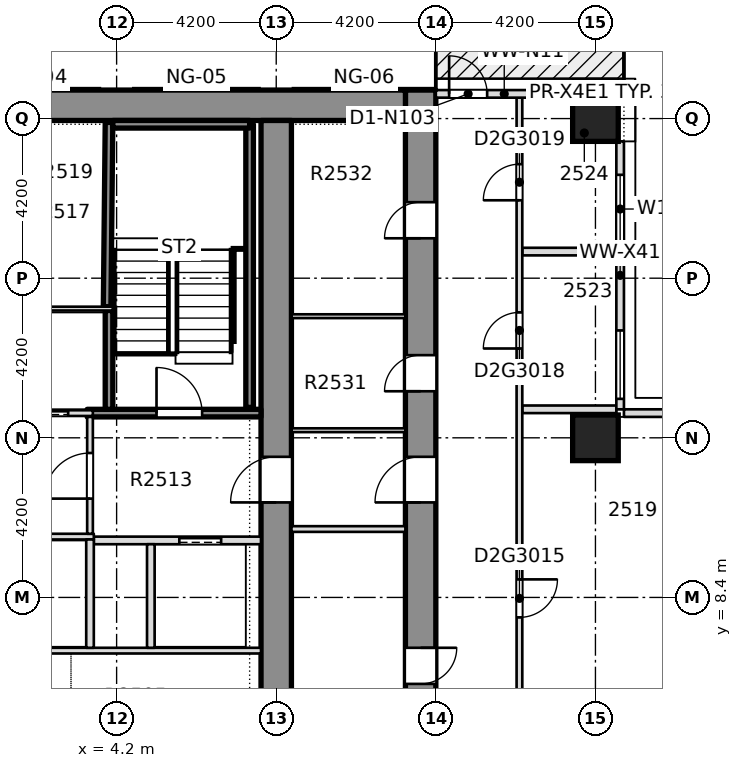
"""IFC4 building model, lengths in metres.
Left out: names, types, materials, properties, quantities, classifications, styles, units other than length and angle.
Written with IfcOpenShell. Run it as: python <this file> out.ifc"""

import sys

from ifc_helpers import new_model, si_unit, direction, frame, frame_2d, origin, origin_2d, place, context, subcontext, project, spatial, rectangle, extrude, element, fill, save


model = new_model("IFC4")
c1 = context("Model", 3, precision=1e-05, world=origin(), true_north=direction((0.0, 1.0)))
c2 = subcontext(c1, "Body", "Model", "MODEL_VIEW")
j1 = project(units=[si_unit("LENGTHUNIT", "METRE"), si_unit("PLANEANGLEUNIT", "RADIAN")], contexts=[c1])
p1 = place(None, origin())
s1 = spatial("IfcSite", under=j1, at=p1, CompositionType="ELEMENT")
p2 = place(p1, origin())
s2 = spatial("IfcBuilding", under=s1, at=p2, CompositionType="ELEMENT")
p3 = place(p2, frame((0.0, 0.0, 101.1)))
s3 = spatial("IfcBuildingStorey", under=s2, at=p3, CompositionType="ELEMENT", Elevation=101.1)
p4 = place(p3, frame((12.2, -8.4, -0.32), z_axis=(0.0, 0.0, 1.0), x_axis=(0.0, 1.0, 0.0)))
e1 = element("IfcWall", 1, at=p4, inside=s3, PredefinedType="SHEAR", context=c2, shape_type="SweptSolid", body=[
    extrude(rectangle(XDim=30.15, YDim=0.8, at=frame_2d((15.075, 0.0))), origin(), (0.0, 0.0, 1.0), 3.45),
])
p5 = place(p4, frame((3.925, 0.0, 0.32)))
e2 = element("IfcOpeningElement", 2, at=p5, cuts=e1, PredefinedType="OPENING", context=c2, shape_type="SweptSolid", body=[
    extrude(rectangle(XDim=0.95, YDim=2.1, at=frame_2d((0.475, 1.05))), frame((0.0, 0.41, 0.0), z_axis=(0.0, -1.0, 0.0), x_axis=(1.0, 0.0, 0.0)), (0.0, 0.0, 1.0), 0.82),
])
p6 = place(p4, frame((9.175, 0.0, 0.32)))
e3 = element("IfcOpeningElement", 3, at=p6, cuts=e1, PredefinedType="OPENING", context=c2, shape_type="SweptSolid", body=[
    extrude(rectangle(XDim=0.95, YDim=2.1, at=frame_2d((0.475, 1.05))), frame((0.0, 0.41, 0.0), z_axis=(0.0, -1.0, 0.0), x_axis=(1.0, 0.0, 0.0)), (0.0, 0.0, 1.0), 0.82),
])
p7 = place(p4, frame((14.525, 0.0, 0.32)))
e4 = element("IfcOpeningElement", 4, at=p7, cuts=e1, PredefinedType="OPENING", context=c2, shape_type="SweptSolid", body=[
    extrude(rectangle(XDim=0.95, YDim=2.1, at=frame_2d((0.475, 1.05))), frame((0.0, 0.41, 0.0), z_axis=(0.0, -1.0, 0.0), x_axis=(1.0, 0.0, 0.0)), (0.0, 0.0, 1.0), 0.82),
])
p8 = place(p4, frame((22.225, 0.0, 0.32)))
e5 = element("IfcOpeningElement", 5, at=p8, cuts=e1, PredefinedType="OPENING", context=c2, shape_type="SweptSolid", body=[
    extrude(rectangle(XDim=0.95, YDim=2.1, at=frame_2d((0.475, 1.05))), frame((0.0, 0.41, 0.0), z_axis=(0.0, -1.0, 0.0), x_axis=(1.0, 0.0, 0.0)), (0.0, 0.0, 1.0), 0.82),
])
p9 = place(p4, frame((26.25, 0.0, 0.32)))
e6 = element("IfcOpeningElement", 6, at=p9, cuts=e1, PredefinedType="OPENING", context=c2, shape_type="SweptSolid", body=[
    extrude(rectangle(XDim=0.95, YDim=2.1, at=frame_2d((0.475, 1.05))), frame((0.0, 0.41, 0.0), z_axis=(0.0, -1.0, 0.0), x_axis=(1.0, 0.0, 0.0)), (0.0, 0.0, 1.0), 0.82),
])
p10 = place(p4, frame((19.3, 0.0, 0.32)))
e7 = element("IfcOpeningElement", 7, at=p10, cuts=e1, PredefinedType="OPENING", context=c2, shape_type="SweptSolid", body=[
    extrude(rectangle(XDim=1.2, YDim=2.1, at=frame_2d((0.6, 1.05))), frame((0.0, 0.41, 0.0), z_axis=(0.0, -1.0, 0.0), x_axis=(1.0, 0.0, 0.0)), (0.0, 0.0, 1.0), 0.82),
])
p11 = place(p3, frame((-11.8, 21.35, -0.32), z_axis=(0.0, 0.0, 1.0), x_axis=(1.0, 0.0, 0.0)))
e8 = element("IfcWall", 8, at=p11, inside=s3, PredefinedType="SHEAR", context=c2, shape_type="SweptSolid", body=[
    extrude(rectangle(XDim=23.6, YDim=0.8, at=frame_2d((11.8, 0.0))), origin(), (0.0, 0.0, 1.0), 3.45),
])
p12 = place(p3, frame((8.4, -7.6, -0.32), z_axis=(0.0, 0.0, 1.0), x_axis=(0.0, 1.0, 0.0)))
e9 = element("IfcWall", 9, at=p12, inside=s3, PredefinedType="SHEAR", context=c2, shape_type="SweptSolid", body=[
    extrude(rectangle(XDim=28.55, YDim=0.8, at=frame_2d((14.275, 0.0))), origin(), (0.0, 0.0, 1.0), 3.45),
])
p13 = place(p12, frame((18.5, 0.0, 0.32)))
e10 = element("IfcOpeningElement", 10, at=p13, cuts=e9, PredefinedType="OPENING", context=c2, shape_type="SweptSolid", body=[
    extrude(rectangle(XDim=1.2, YDim=2.1, at=frame_2d((0.6, 1.05))), frame((0.0, 0.41, 0.0), z_axis=(0.0, -1.0, 0.0), x_axis=(1.0, 0.0, 0.0)), (0.0, 0.0, 1.0), 0.82),
])
for number, where, z_axis, x_axis in (
    (11, (16.8, 12.6, -0.32), (0.0, 0.0, 1.0), (1.0, 0.0, 0.0)),
    (12, (16.8, 21.0, -0.32), (0.0, 0.0, 1.0), (1.0, 0.0, 0.0)),
):
    element("IfcColumn", number, at=place(p3, frame(where, z_axis=z_axis, x_axis=x_axis)), inside=s3, PredefinedType="COLUMN", context=c2, shape_type="SweptSolid", body=[
        extrude(rectangle(XDim=1.2, YDim=1.2, at=origin_2d()), origin(), (0.0, 0.0, 1.0), 3.45),
    ])
for number, where, z_axis, x_axis in (
    (13, (14.875, 13.35, 0.0), (0.0, 0.0, 1.0), (1.0, 0.0, 0.0)),
    (14, (14.875, 17.5, 0.0), (0.0, 0.0, 1.0), (1.0, 0.0, 0.0)),
):
    element("IfcWall", number, at=place(p3, frame(where, z_axis=z_axis, x_axis=x_axis)), inside=s3, PredefinedType="PARTITIONING", context=c2, shape_type="SweptSolid", body=[
        extrude(rectangle(XDim=2.475, YDim=0.2, at=frame_2d((1.238, 0.0))), origin(), (0.0, 0.0, 1.0), 3.13),
    ])
p14 = place(p3, frame((14.8, -10.6, 0.0), z_axis=(0.0, 0.0, 1.0), x_axis=(0.0, 1.0, 0.0)))
e15 = element("IfcWall", 15, at=p14, inside=s3, PredefinedType="PARTITIONING", context=c2, shape_type="SweptSolid", body=[
    extrude(rectangle(XDim=32.15, YDim=0.15, at=frame_2d((16.075, 0.0))), origin(), (0.0, 0.0, 1.0), 3.13),
])
p15 = place(p14, frame((1.05, 0.0, 0.0)))
e16 = element("IfcOpeningElement", 16, at=p15, cuts=e15, PredefinedType="OPENING", context=c2, shape_type="SweptSolid", body=[
    extrude(rectangle(XDim=0.95, YDim=2.1, at=frame_2d((0.475, 1.05))), frame((0.0, 0.085, 0.0), z_axis=(0.0, -1.0, 0.0), x_axis=(1.0, 0.0, 0.0)), (0.0, 0.0, 1.0), 0.17),
])
p16 = place(p14, frame((18.475, 0.0, 0.0)))
e17 = element("IfcOpeningElement", 17, at=p16, cuts=e15, PredefinedType="OPENING", context=c2, shape_type="SweptSolid", body=[
    extrude(rectangle(XDim=1.0, YDim=2.1, at=frame_2d((0.5, 1.05))), frame((0.0, 0.085, 0.0), z_axis=(0.0, -1.0, 0.0), x_axis=(1.0, 0.0, 0.0)), (0.0, 0.0, 1.0), 0.17),
])
p17 = place(p14, frame((25.55, 0.0, 0.0)))
e18 = element("IfcOpeningElement", 18, at=p17, cuts=e15, PredefinedType="OPENING", context=c2, shape_type="SweptSolid", body=[
    extrude(rectangle(XDim=0.95, YDim=2.1, at=frame_2d((0.475, 1.05))), frame((0.0, 0.085, 0.0), z_axis=(0.0, -1.0, 0.0), x_axis=(1.0, 0.0, 0.0)), (0.0, 0.0, 1.0), 0.17),
])
p18 = place(p14, frame((29.45, 0.0, 0.0)))
e19 = element("IfcOpeningElement", 19, at=p18, cuts=e15, PredefinedType="OPENING", context=c2, shape_type="SweptSolid", body=[
    extrude(rectangle(XDim=0.95, YDim=2.1, at=frame_2d((0.475, 1.05))), frame((0.0, 0.085, 0.0), z_axis=(0.0, -1.0, 0.0), x_axis=(1.0, 0.0, 0.0)), (0.0, 0.0, 1.0), 0.17),
])
p19 = place(p14, frame((10.05, 0.0, 0.0)))
e20 = element("IfcOpeningElement", 20, at=p19, cuts=e15, PredefinedType="OPENING", context=c2, shape_type="SweptSolid", body=[
    extrude(rectangle(XDim=1.1, YDim=2.1, at=frame_2d((0.55, 1.05))), frame((0.0, 0.085, 0.0), z_axis=(0.0, -1.0, 0.0), x_axis=(1.0, 0.0, 0.0)), (0.0, 0.0, 1.0), 0.17),
])
p20 = place(p14, frame((4.85, 0.0, 0.0)))
e21 = element("IfcOpeningElement", 21, at=p20, cuts=e15, PredefinedType="OPENING", context=c2, shape_type="SweptSolid", body=[
    extrude(rectangle(XDim=1.0, YDim=2.1, at=frame_2d((0.5, 1.05))), frame((0.0, 0.085, 0.0), z_axis=(0.0, -1.0, 0.0), x_axis=(1.0, 0.0, 0.0)), (0.0, 0.0, 1.0), 0.17),
])
p21 = place(p3, frame((24.6, 13.25, 0.0), z_axis=(0.0, 0.0, 1.0), x_axis=(-1.0, 0.0, 0.0)))
e22 = element("IfcWall", 22, at=p21, inside=s3, PredefinedType="STANDARD", context=c2, shape_type="SweptSolid", body=[
    extrude(rectangle(XDim=7.05, YDim=0.2, at=frame_2d((3.525, 0.0))), origin(), (0.0, 0.0, 1.0), 3.13),
])
p22 = place(p3, frame((17.45, 13.35, 0.0), z_axis=(0.0, 0.0, 1.0), x_axis=(0.0, 1.0, 0.0)))
e23 = element("IfcWall", 23, at=p22, inside=s3, PredefinedType="STANDARD", context=c2, shape_type="SweptSolid", body=[
    extrude(rectangle(XDim=7.05, YDim=0.2, at=frame_2d((3.525, 0.0))), origin(), (0.0, 0.0, 1.0), 3.13),
])
p23 = place(p22, frame((0.275, 0.0, 0.2)))
e24 = element("IfcOpeningElement", 24, at=p23, cuts=e23, PredefinedType="OPENING", context=c2, shape_type="SweptSolid", body=[
    extrude(rectangle(XDim=1.8, YDim=2.65, at=frame_2d((0.9, 1.325))), frame((0.0, 0.11, 0.0), z_axis=(0.0, -1.0, 0.0), x_axis=(1.0, 0.0, 0.0)), (0.0, 0.0, 1.0), 0.22),
])
p24 = place(p22, frame((4.37, 0.0, 0.2)))
e25 = element("IfcOpeningElement", 25, at=p24, cuts=e23, PredefinedType="OPENING", context=c2, shape_type="SweptSolid", body=[
    extrude(rectangle(XDim=1.8, YDim=2.65, at=frame_2d((0.9, 1.325))), frame((0.0, 0.11, 0.0), z_axis=(0.0, -1.0, 0.0), x_axis=(1.0, 0.0, 0.0)), (0.0, 0.0, 1.0), 0.22),
])
p25 = place(p3, frame((16.2, 21.65, 0.0), z_axis=(0.0, 0.0, 1.0), x_axis=(-1.0, 0.0, 0.0)))
e26 = element("IfcWall", 26, at=p25, inside=s3, PredefinedType="STANDARD", context=c2, shape_type="SweptSolid", body=[
    extrude(rectangle(XDim=3.6, YDim=0.2, at=frame_2d((1.8, 0.0))), origin(), (0.0, 0.0, 1.0), 3.13),
])
p26 = place(p25, frame((2.25, 0.0, 0.0)))
e27 = element("IfcOpeningElement", 27, at=p26, cuts=e26, PredefinedType="OPENING", context=c2, shape_type="SweptSolid", body=[
    extrude(rectangle(XDim=1.0, YDim=2.4, at=frame_2d((0.5, 1.2))), frame((0.0, 0.11, 0.0), z_axis=(0.0, -1.0, 0.0), x_axis=(1.0, 0.0, 0.0)), (0.0, 0.0, 1.0), 0.22),
])
p27 = place(p3, frame((-7.999, 7.0, 0.0), z_axis=(0.0, 0.0, 1.0), x_axis=(1.0, 0.0, 0.0)))
e28 = element("IfcWall", 28, at=p27, inside=s3, PredefinedType="PARTITIONING", context=c2, shape_type="SweptSolid", body=[
    extrude(rectangle(XDim=15.998, YDim=0.15, at=frame_2d((7.999, 0.0))), origin(), (0.0, 0.0, 1.0), 3.13),
])
p28 = place(p27, frame((7.299, 0.0, 0.0)))
e29 = element("IfcOpeningElement", 29, at=p28, cuts=e28, PredefinedType="OPENING", context=c2, shape_type="SweptSolid", body=[
    extrude(rectangle(XDim=1.4, YDim=2.1, at=frame_2d((0.7, 1.05))), frame((0.0, 0.085, 0.0), z_axis=(0.0, -1.0, 0.0), x_axis=(1.0, 0.0, 0.0)), (0.0, 0.0, 1.0), 0.17),
])
p29 = place(p3, frame((3.6, 9.9, 0.0), z_axis=(0.0, 0.0, 1.0), x_axis=(1.0, 0.0, 0.0)))
e30 = element("IfcWall", 30, at=p29, inside=s3, PredefinedType="PARTITIONING", context=c2, shape_type="SweptSolid", body=[
    extrude(rectangle(XDim=4.399, YDim=0.2, at=frame_2d((2.199, 0.0))), origin(), (0.0, 0.0, 1.0), 3.13),
])
p30 = place(p29, frame((2.25, 0.0, 0.0)))
e31 = element("IfcOpeningElement", 31, at=p30, cuts=e30, PredefinedType="OPENING", context=c2, shape_type="SweptSolid", body=[
    extrude(rectangle(XDim=1.1, YDim=2.1, at=frame_2d((0.55, 1.05))), frame((0.0, 0.11, 0.0), z_axis=(0.0, -1.0, 0.0), x_axis=(1.0, 0.0, 0.0)), (0.0, 0.0, 1.0), 0.22),
])
p31 = place(p3, frame((-3.6, 10.0, 0.0), z_axis=(0.0, 0.0, 1.0), x_axis=(1.0, 0.0, 0.0)))
e32 = element("IfcWall", 32, at=p31, inside=s3, PredefinedType="PARTITIONING", context=c2, shape_type="SweptSolid", body=[
    extrude(rectangle(XDim=7.2, YDim=0.15, at=frame_2d((3.6, 0.0))), origin(), (0.0, 0.0, 1.0), 3.13),
])
p32 = place(p31, frame((2.9, 0.0, 0.0)))
e33 = element("IfcOpeningElement", 33, at=p32, cuts=e32, PredefinedType="OPENING", context=c2, shape_type="SweptSolid", body=[
    extrude(rectangle(XDim=1.4, YDim=2.1, at=frame_2d((0.7, 1.05))), frame((0.0, 0.085, 0.0), z_axis=(0.0, -1.0, 0.0), x_axis=(1.0, 0.0, 0.0)), (0.0, 0.0, 1.0), 0.17),
])
p33 = place(p3, frame((-3.575, 13.25, 0.0), z_axis=(0.0, 0.0, 1.0), x_axis=(1.0, 0.0, 0.0)))
e34 = element("IfcWall", 34, at=p33, inside=s3, PredefinedType="PARTITIONING", context=c2, shape_type="SweptSolid", body=[
    extrude(rectangle(XDim=7.15, YDim=0.15, at=frame_2d((3.575, 0.0))), origin(), (0.0, 0.0, 1.0), 3.13),
])
p34 = place(p33, frame((0.6, 0.0, 0.0)))
e35 = element("IfcOpeningElement", 35, at=p34, cuts=e34, PredefinedType="OPENING", context=c2, shape_type="SweptSolid", body=[
    extrude(rectangle(XDim=1.2, YDim=2.1, at=frame_2d((0.6, 1.05))), frame((0.0, 0.085, 0.0), z_axis=(0.0, -1.0, 0.0), x_axis=(1.0, 0.0, 0.0)), (0.0, 0.0, 1.0), 0.17),
])
p35 = place(p33, frame((5.4, 0.0, 0.0)))
e36 = element("IfcOpeningElement", 36, at=p35, cuts=e34, PredefinedType="OPENING", context=c2, shape_type="SweptSolid", body=[
    extrude(rectangle(XDim=1.1, YDim=2.1, at=frame_2d((0.55, 1.05))), frame((0.0, 0.085, 0.0), z_axis=(0.0, -1.0, 0.0), x_axis=(1.0, 0.0, 0.0)), (0.0, 0.0, 1.0), 0.17),
])
p36 = place(p33, frame((2.975, 0.0, 0.0)))
e37 = element("IfcOpeningElement", 37, at=p36, cuts=e34, PredefinedType="OPENING", context=c2, shape_type="SweptSolid", body=[
    extrude(rectangle(XDim=1.2, YDim=2.1, at=frame_2d((0.6, 1.05))), frame((0.0, 0.085, 0.0), z_axis=(0.0, -1.0, 0.0), x_axis=(1.0, 0.0, 0.0)), (0.0, 0.0, 1.0), 0.17),
])
p37 = place(p3, frame((3.425, 13.25, 0.0), z_axis=(0.0, 0.0, 1.0), x_axis=(1.0, 0.0, 0.0)))
e38 = element("IfcWall", 38, at=p37, inside=s3, PredefinedType="SOLIDWALL", context=c2, shape_type="SweptSolid", body=[
    extrude(rectangle(XDim=4.574, YDim=0.2, at=frame_2d((2.287, 0.0))), origin(), (0.0, 0.0, 1.0), 3.13),
])
p38 = place(p37, frame((1.825, 0.0, 0.0)))
e39 = element("IfcOpeningElement", 39, at=p38, cuts=e38, PredefinedType="OPENING", context=c2, shape_type="SweptSolid", body=[
    extrude(rectangle(XDim=1.2, YDim=2.1, at=frame_2d((0.6, 1.05))), frame((0.0, 0.11, 0.0), z_axis=(0.0, -1.0, 0.0), x_axis=(1.0, 0.0, 0.0)), (0.0, 0.0, 1.0), 0.22),
])
p39 = place(p3, frame((0.65, 16.0, 0.0), z_axis=(0.0, 0.0, 1.0), x_axis=(1.0, 0.0, 0.0)))
e40 = element("IfcWall", 40, at=p39, inside=s3, PredefinedType="PARTITIONING", context=c2, shape_type="SweptSolid", body=[
    extrude(rectangle(XDim=3.45, YDim=0.1, at=frame_2d((1.725, 0.0))), origin(), (0.0, 0.0, 1.0), 3.13),
])
p40 = place(p3, frame((3.5, 7.075, 0.0), z_axis=(0.0, 0.0, 1.0), x_axis=(0.0, 1.0, 0.0)))
e41 = element("IfcWall", 41, at=p40, inside=s3, PredefinedType="PARTITIONING", context=c2, shape_type="SweptSolid", body=[
    extrude(rectangle(XDim=2.85, YDim=0.2, at=frame_2d((1.425, 0.0))), origin(), (0.0, 0.0, 1.0), 3.13),
])
p41 = place(p3, frame((3.5, 10.075, 0.0), z_axis=(0.0, 0.0, 1.0), x_axis=(0.0, 1.0, 0.0)))
e42 = element("IfcWall", 42, at=p41, inside=s3, PredefinedType="PARTITIONING", context=c2, shape_type="SweptSolid", body=[
    extrude(rectangle(XDim=3.075, YDim=0.15, at=frame_2d((1.538, 0.0))), origin(), (0.0, 0.0, 1.0), 3.13),
])
p42 = place(p41, frame((0.925, 0.0, 0.0)))
e43 = element("IfcOpeningElement", 43, at=p42, cuts=e42, PredefinedType="OPENING", context=c2, shape_type="SweptSolid", body=[
    extrude(rectangle(XDim=1.2, YDim=2.1, at=frame_2d((0.6, 1.05))), frame((0.0, 0.085, 0.0), z_axis=(0.0, -1.0, 0.0), x_axis=(1.0, 0.0, 0.0)), (0.0, 0.0, 1.0), 0.17),
])
p43 = place(p3, frame((4.0, 13.35, 0.0), z_axis=(0.0, 0.0, 1.0), x_axis=(0.0, 1.0, 0.0)))
e44 = element("IfcWall", 44, at=p43, inside=s3, PredefinedType="SOLIDWALL", context=c2, shape_type="SweptSolid", body=[
    extrude(rectangle(XDim=2.6, YDim=0.2, at=frame_2d((1.3, 0.0))), origin(), (0.0, 0.0, 1.0), 3.13),
])
p44 = place(p3, frame((3.95, 16.05, 0.0), z_axis=(0.0, 0.0, 1.0), x_axis=(0.01032118628, 0.999946735138, 0.0)))
e45 = element("IfcWall", 45, at=p44, inside=s3, PredefinedType="SOLIDWALL", context=c2, shape_type="SweptSolid", body=[
    extrude(rectangle(XDim=4.849, YDim=0.2, at=frame_2d((2.425, 0.0))), origin(), (0.0, 0.0, 1.0), 3.13),
])
p45 = place(p3, frame((5.1, 7.075, 0.0), z_axis=(0.0, 0.0, 1.0), x_axis=(0.0, 1.0, 0.0)))
e46 = element("IfcWall", 46, at=p45, inside=s3, PredefinedType="PARTITIONING", context=c2, shape_type="SweptSolid", body=[
    extrude(rectangle(XDim=2.725, YDim=0.2, at=frame_2d((1.363, 0.0))), origin(), (0.0, 0.0, 1.0), 3.13),
])
p46 = place(p3, frame((8.801, 10.2, 0.0), z_axis=(0.0, 0.0, 1.0), x_axis=(1.0, 0.0, 0.0)))
e47 = element("IfcWall", 47, at=p46, inside=s3, PredefinedType="PARTITIONING", context=c2, shape_type="SweptSolid", body=[
    extrude(rectangle(XDim=2.998, YDim=0.15, at=frame_2d((1.499, 0.0))), origin(), (0.0, 0.0, 1.0), 3.13),
])
for number, where, z_axis, x_axis in (
    (48, (8.801, 12.8, 0.0), (0.0, 0.0, 1.0), (1.0, 0.0, 0.0)),
    (49, (8.801, 15.8, 0.0), (0.0, 0.0, 1.0), (1.0, 0.0, 0.0)),
):
    element("IfcWall", number, at=place(p3, frame(where, z_axis=z_axis, x_axis=x_axis)), inside=s3, PredefinedType="PARTITIONING", context=c2, shape_type="SweptSolid", body=[
        extrude(rectangle(XDim=2.998, YDim=0.1, at=frame_2d((1.499, 0.0))), origin(), (0.0, 0.0, 1.0), 3.13),
    ])
p47 = place(p3, frame((7.7, 13.4, 0.0), z_axis=(0.0, 0.0, 1.0), x_axis=(0.0, 1.0, 0.0)))
e50 = element("IfcWall", 50, at=p47, inside=s3, PredefinedType="SOLIDWALL", context=c2, shape_type="SweptSolid", body=[
    extrude(rectangle(XDim=7.45, YDim=0.2, at=frame_2d((3.725, 0.0))), origin(), (0.0, 0.0, 1.0), 3.13),
])
p48 = place(p3, frame((4.1, 20.85, 0.0), z_axis=(0.0, 0.0, 1.0), x_axis=(1.0, 0.0, 0.0)))
e51 = element("IfcWall", 51, at=p48, inside=s3, PredefinedType="SOLIDWALL", context=c2, shape_type="SweptSolid", body=[
    extrude(rectangle(XDim=3.6, YDim=0.2, at=frame_2d((1.8, 0.0))), origin(), (0.0, 0.0, 1.0), 3.13),
])
p49 = place(p16, origin())
e52 = element("IfcDoor", 52, at=p49, inside=s3, OperationType="SINGLE_SWING_LEFT", PredefinedType="DOOR", context=c2, shape_type="SweptSolid", body=[
    extrude(rectangle(XDim=1.0, YDim=2.1, at=frame_2d((0.5, 1.05))), frame((0.0, 0.025, 0.0), z_axis=(0.0, -1.0, 0.0), x_axis=(1.0, 0.0, 0.0)), (0.0, 0.0, 1.0), 0.05),
])
fill(e17, e52)
p50 = place(p17, origin())
e53 = element("IfcDoor", 53, at=p50, inside=s3, OperationType="SINGLE_SWING_RIGHT", PredefinedType="DOOR", context=c2, shape_type="SweptSolid", body=[
    extrude(rectangle(XDim=0.95, YDim=2.1, at=frame_2d((0.475, 1.05))), frame((0.0, 0.025, 0.0), z_axis=(0.0, -1.0, 0.0), x_axis=(1.0, 0.0, 0.0)), (0.0, 0.0, 1.0), 0.05),
])
fill(e18, e53)
p51 = place(p18, origin())
e54 = element("IfcDoor", 54, at=p51, inside=s3, OperationType="SINGLE_SWING_LEFT", PredefinedType="DOOR", context=c2, shape_type="SweptSolid", body=[
    extrude(rectangle(XDim=0.95, YDim=2.1, at=frame_2d((0.475, 1.05))), frame((0.0, 0.025, 0.0), z_axis=(0.0, -1.0, 0.0), x_axis=(1.0, 0.0, 0.0)), (0.0, 0.0, 1.0), 0.05),
])
fill(e19, e54)
p52 = place(p23, origin())
e55 = element("IfcWindow", 55, at=p52, inside=s3, PartitioningType="SINGLE_PANEL", PredefinedType="WINDOW", context=c2, shape_type="SweptSolid", body=[
    extrude(rectangle(XDim=1.8, YDim=2.65, at=frame_2d((0.9, 1.325))), frame((0.0, 0.03, 0.0), z_axis=(0.0, -1.0, 0.0), x_axis=(1.0, 0.0, 0.0)), (0.0, 0.0, 1.0), 0.06),
])
fill(e24, e55)
p53 = place(p24, origin())
e56 = element("IfcWindow", 56, at=p53, inside=s3, PartitioningType="SINGLE_PANEL", PredefinedType="WINDOW", context=c2, shape_type="SweptSolid", body=[
    extrude(rectangle(XDim=1.8, YDim=2.65, at=frame_2d((0.9, 1.325))), frame((0.0, 0.03, 0.0), z_axis=(0.0, -1.0, 0.0), x_axis=(1.0, 0.0, 0.0)), (0.0, 0.0, 1.0), 0.06),
])
fill(e25, e56)
p54 = place(p26, origin())
e57 = element("IfcDoor", 57, at=p54, inside=s3, OperationType="SINGLE_SWING_LEFT", PredefinedType="DOOR", context=c2, shape_type="SweptSolid", body=[
    extrude(rectangle(XDim=1.0, YDim=2.4, at=frame_2d((0.5, 1.2))), frame((0.0, 0.025, 0.0), z_axis=(0.0, -1.0, 0.0), x_axis=(1.0, 0.0, 0.0)), (0.0, 0.0, 1.0), 0.05),
])
fill(e27, e57)
p55 = place(p38, origin())
e58 = element("IfcDoor", 58, at=p55, inside=s3, OperationType="SINGLE_SWING_RIGHT", PredefinedType="DOOR", context=c2, shape_type="SweptSolid", body=[
    extrude(rectangle(XDim=1.2, YDim=2.1, at=frame_2d((0.6, 1.05))), frame((0.0, 0.025, 0.0), z_axis=(0.0, -1.0, 0.0), x_axis=(1.0, 0.0, 0.0)), (0.0, 0.0, 1.0), 0.05),
])
fill(e39, e58)
p56 = place(p30, origin())
e59 = element("IfcDoor", 59, at=p56, inside=s3, OperationType="SLIDING_TO_LEFT", PredefinedType="DOOR", context=c2, shape_type="SweptSolid", body=[
    extrude(rectangle(XDim=1.1, YDim=2.1, at=frame_2d((0.55, 1.05))), frame((0.0, 0.025, 0.0), z_axis=(0.0, -1.0, 0.0), x_axis=(1.0, 0.0, 0.0)), (0.0, 0.0, 1.0), 0.05),
])
fill(e31, e59)
p57 = place(p35, origin())
e60 = element("IfcDoor", 60, at=p57, inside=s3, OperationType="SLIDING_TO_LEFT", PredefinedType="DOOR", context=c2, shape_type="SweptSolid", body=[
    extrude(rectangle(XDim=1.1, YDim=2.1, at=frame_2d((0.55, 1.05))), frame((0.0, 0.025, 0.0), z_axis=(0.0, -1.0, 0.0), x_axis=(1.0, 0.0, 0.0)), (0.0, 0.0, 1.0), 0.05),
])
fill(e36, e60)
p58 = place(p42, origin())
e61 = element("IfcDoor", 61, at=p58, inside=s3, OperationType="SINGLE_SWING_LEFT", PredefinedType="DOOR", context=c2, shape_type="SweptSolid", body=[
    extrude(rectangle(XDim=1.2, YDim=2.1, at=frame_2d((0.6, 1.05))), frame((0.0, 0.025, 0.0), z_axis=(0.0, -1.0, 0.0), x_axis=(1.0, 0.0, 0.0)), (0.0, 0.0, 1.0), 0.05),
])
fill(e43, e61)
p59 = place(p7, origin())
e62 = element("IfcDoor", 62, at=p59, inside=s3, OperationType="SINGLE_SWING_LEFT", PredefinedType="DOOR", context=c2, shape_type="SweptSolid", body=[
    extrude(rectangle(XDim=0.95, YDim=2.1, at=frame_2d((0.475, 1.05))), frame((0.0, 0.025, 0.0), z_axis=(0.0, -1.0, 0.0), x_axis=(1.0, 0.0, 0.0)), (0.0, 0.0, 1.0), 0.05),
])
fill(e4, e62)
p60 = place(p8, origin())
e63 = element("IfcDoor", 63, at=p60, inside=s3, OperationType="SINGLE_SWING_LEFT", PredefinedType="DOOR", context=c2, shape_type="SweptSolid", body=[
    extrude(rectangle(XDim=0.95, YDim=2.1, at=frame_2d((0.475, 1.05))), frame((0.0, 0.025, 0.0), z_axis=(0.0, -1.0, 0.0), x_axis=(1.0, 0.0, 0.0)), (0.0, 0.0, 1.0), 0.05),
])
fill(e5, e63)
p61 = place(p9, origin())
e64 = element("IfcDoor", 64, at=p61, inside=s3, OperationType="SINGLE_SWING_LEFT", PredefinedType="DOOR", context=c2, shape_type="SweptSolid", body=[
    extrude(rectangle(XDim=0.95, YDim=2.1, at=frame_2d((0.475, 1.05))), frame((0.0, 0.025, 0.0), z_axis=(0.0, -1.0, 0.0), x_axis=(1.0, 0.0, 0.0)), (0.0, 0.0, 1.0), 0.05),
])
fill(e6, e64)
p62 = place(p10, origin())
e65 = element("IfcDoor", 65, at=p62, inside=s3, OperationType="SINGLE_SWING_LEFT", PredefinedType="DOOR", context=c2, shape_type="SweptSolid", body=[
    extrude(rectangle(XDim=1.2, YDim=2.1, at=frame_2d((0.6, 1.05))), frame((0.0, 0.025, 0.0), z_axis=(0.0, -1.0, 0.0), x_axis=(1.0, 0.0, 0.0)), (0.0, 0.0, 1.0), 0.05),
])
fill(e7, e65)
p63 = place(p13, origin())
e66 = element("IfcDoor", 66, at=p63, inside=s3, OperationType="SINGLE_SWING_LEFT", PredefinedType="DOOR", context=c2, shape_type="SweptSolid", body=[
    extrude(rectangle(XDim=1.2, YDim=2.1, at=frame_2d((0.6, 1.05))), frame((0.0, 0.025, 0.0), z_axis=(0.0, -1.0, 0.0), x_axis=(1.0, 0.0, 0.0)), (0.0, 0.0, 1.0), 0.05),
])
fill(e10, e66)
save(model, sys.argv[1])
